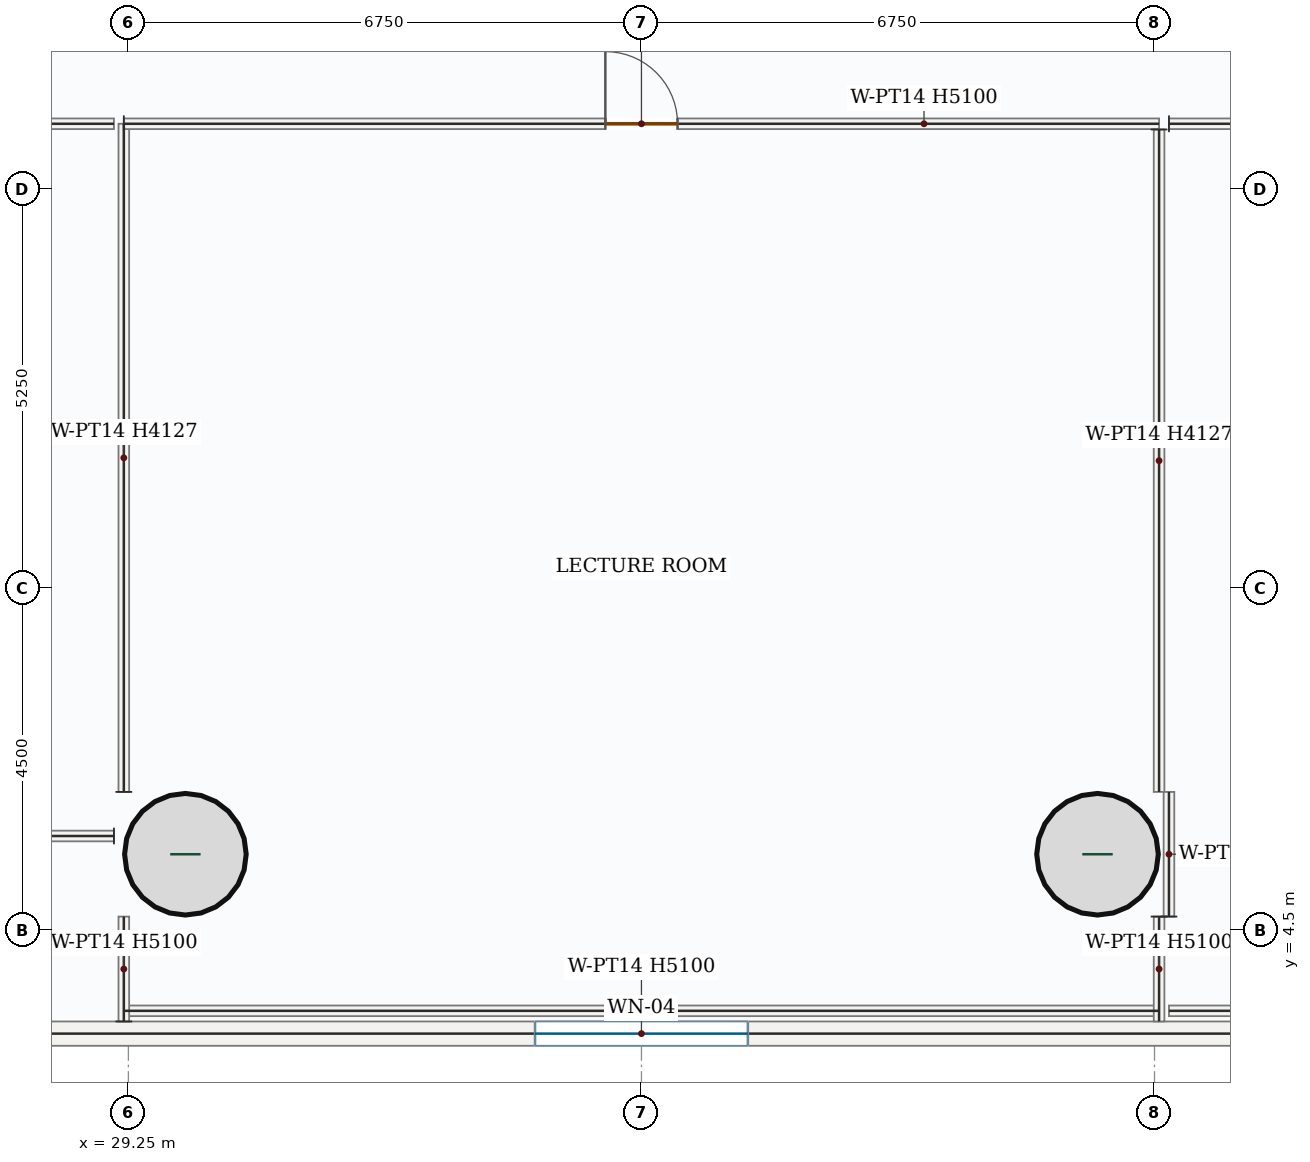
"""IFC4 building model, lengths in metres.
Left out: names, types, materials, properties, quantities, classifications, styles, units other than length and angle.
Written with IfcOpenShell. Run it as: python <this file> out.ifc"""

import sys

from ifc_helpers import new_model, si_unit, direction, frame, frame_2d, origin, origin_2d, place, context, subcontext, project, spatial, rectangle, hollow_circle, extrude, source, transform, mapped, element, fill, save


model = new_model("IFC4")
c1 = context("Model", 3, precision=1e-05, world=origin(), true_north=direction((0.0, 1.0)))
c2 = subcontext(c1, "Body", "Model", "MODEL_VIEW")
j1 = project(units=[si_unit("LENGTHUNIT", "METRE"), si_unit("PLANEANGLEUNIT", "RADIAN")], contexts=[c1])
p1 = place(None, origin())
s1 = spatial("IfcSite", under=j1, at=p1, CompositionType="ELEMENT")
p2 = place(p1, origin())
s2 = spatial("IfcBuilding", under=s1, at=p2, CompositionType="ELEMENT")
p3 = place(p2, frame((0.0, 0.0, 12.6)))
s3 = spatial("IfcBuildingStorey", under=s2, at=p3, CompositionType="ELEMENT", Elevation=12.6)
m1 = source(origin(), c2, "Body", "SweptSolid", [
    extrude(hollow_circle(Radius=0.8, WallThickness=0.06, at=origin_2d()), origin(), (0.0, 0.0, 1.0), 5.4),
])
for number, where, z_axis, x_axis in (
    (1, (30.0, 5.5, 0.0), (0.0, 0.0, 1.0), (1.0, 0.0, 0.0)),
    (2, (42.0, 5.5, 0.0), (0.0, 0.0, 1.0), (1.0, 0.0, 0.0)),
):
    element("IfcColumn", number, at=place(p3, frame(where, z_axis=z_axis, x_axis=x_axis)), inside=s3, PredefinedType="COLUMN", context=c2, shape_type="MappedRepresentation", body=[
        mapped(m1, transform((0.0, 0.0, 0.0), x_axis=(1.0, 0.0, 0.0), y_axis=(0.0, 1.0, 0.0), z_axis=(0.0, 0.0, 1.0), scale=1.0)),
    ])
p4 = place(p3, frame((67.16, 3.14, 0.0), z_axis=(0.0, 0.0, 1.0), x_axis=(-1.0, 0.0, 0.0)))
e3 = element("IfcWall", 3, at=p4, inside=s3, PredefinedType="SOLIDWALL", context=c2, shape_type="SweptSolid", body=[
    extrude(rectangle(XDim=62.32, YDim=0.32, at=frame_2d((31.16, 0.0))), origin(), (0.0, 0.0, 1.0), 5.1),
])
p5 = place(p4, frame((29.76, 0.0, 0.85)))
e4 = element("IfcOpeningElement", 4, at=p5, cuts=e3, PredefinedType="OPENING", context=c2, shape_type="SweptSolid", body=[
    extrude(rectangle(XDim=2.8, YDim=2.4, at=frame_2d((1.4, 1.2))), frame((0.0, 0.17, 0.0), z_axis=(0.0, -1.0, 0.0), x_axis=(1.0, 0.0, 0.0)), (0.0, 0.0, 1.0), 0.34),
])
m2 = source(origin(), c2, "Body", "SweptSolid", [
    extrude(rectangle(XDim=13.62, YDim=0.14, at=frame_2d((6.81, 0.0))), origin(), (0.0, 0.0, 1.0), 5.1),
])
p6 = place(p3, frame((42.81, 3.44, 0.0), z_axis=(0.0, 0.0, 1.0), x_axis=(-1.0, 0.0, 0.0)))
e5 = element("IfcWall", 5, at=p6, inside=s3, PredefinedType="PARTITIONING", context=c2, shape_type="MappedRepresentation", body=[
    mapped(m2, transform((0.0, 0.0, 0.0), x_axis=(1.0, 0.0, 0.0), y_axis=(0.0, 1.0, 0.0), z_axis=(0.0, 0.0, 1.0), scale=1.0)),
])
m3 = source(origin(), c2, "Body", "SweptSolid", [
    extrude(rectangle(XDim=1.38, YDim=0.14, at=frame_2d((0.69, 0.0))), origin(), (0.0, 0.0, 1.0), 5.1),
])
p7 = place(p3, frame((29.19, 3.3, 0.0), z_axis=(0.0, 0.0, 1.0), x_axis=(0.0, 1.0, 0.0)))
e6 = element("IfcWall", 6, at=p7, inside=s3, PredefinedType="PARTITIONING", context=c2, shape_type="MappedRepresentation", body=[
    mapped(m3, transform((0.0, 0.0, 0.0), x_axis=(1.0, 0.0, 0.0), y_axis=(0.0, 1.0, 0.0), z_axis=(0.0, 0.0, 1.0), scale=1.0)),
])
m4 = source(origin(), c2, "Body", "SweptSolid", [
    extrude(rectangle(XDim=8.79, YDim=0.14, at=frame_2d((4.395, 0.0))), origin(), (0.0, 0.0, 1.0), 4.127),
])
p8 = place(p3, frame((29.19, 6.32, 0.0), z_axis=(0.0, 0.0, 1.0), x_axis=(0.0, 1.0, 0.0)))
e7 = element("IfcWall", 7, at=p8, inside=s3, PredefinedType="PARTITIONING", context=c2, shape_type="MappedRepresentation", body=[
    mapped(m4, transform((0.0, 0.0, 0.0), x_axis=(1.0, 0.0, 0.0), y_axis=(0.0, 1.0, 0.0), z_axis=(0.0, 0.0, 1.0), scale=1.0)),
])
p9 = place(p3, frame((29.19, 15.11, 0.0), z_axis=(0.0, 0.0, 1.0), x_axis=(1.0, 0.0, 0.0)))
e8 = element("IfcWall", 8, at=p9, inside=s3, PredefinedType="PARTITIONING", context=c2, shape_type="SweptSolid", body=[
    extrude(rectangle(XDim=13.62, YDim=0.14, at=frame_2d((6.81, 0.0))), origin(), (0.0, 0.0, 1.0), 5.1),
])
p10 = place(p9, frame((6.335, 0.0, 0.0)))
e9 = element("IfcOpeningElement", 9, at=p10, cuts=e8, PredefinedType="OPENING", context=c2, shape_type="SweptSolid", body=[
    extrude(rectangle(XDim=0.95, YDim=2.15, at=frame_2d((0.475, 1.075))), frame((0.0, 0.08, 0.0), z_axis=(0.0, -1.0, 0.0), x_axis=(1.0, 0.0, 0.0)), (0.0, 0.0, 1.0), 0.16),
])
m5 = source(origin(), c2, "Body", "SweptSolid", [
    extrude(rectangle(XDim=8.715, YDim=0.14, at=frame_2d((4.357, 0.0))), origin(), (0.0, 0.0, 1.0), 4.127),
])
p11 = place(p3, frame((42.81, 15.035, 0.0), z_axis=(0.0, 0.0, 1.0), x_axis=(0.0, -1.0, 0.0)))
e10 = element("IfcWall", 10, at=p11, inside=s3, PredefinedType="PARTITIONING", context=c2, shape_type="MappedRepresentation", body=[
    mapped(m5, transform((0.0, 0.0, 0.0), x_axis=(1.0, 0.0, 0.0), y_axis=(0.0, 1.0, 0.0), z_axis=(0.0, 0.0, 1.0), scale=1.0)),
])
p12 = place(p3, frame((42.81, 4.68, 0.0), z_axis=(0.0, 0.0, 1.0), x_axis=(0.0, -1.0, 0.0)))
e11 = element("IfcWall", 11, at=p12, inside=s3, PredefinedType="PARTITIONING", context=c2, shape_type="MappedRepresentation", body=[
    mapped(m3, transform((0.0, 0.0, 0.0), x_axis=(1.0, 0.0, 0.0), y_axis=(0.0, 1.0, 0.0), z_axis=(0.0, 0.0, 1.0), scale=1.0)),
])
m6 = source(origin(), c2, "Body", "SweptSolid", [
    extrude(rectangle(XDim=21.74, YDim=0.14, at=frame_2d((10.87, 0.0))), origin(), (0.0, 0.0, 1.0), 4.47),
])
p13 = place(p3, frame((29.06, 5.74, 0.0), z_axis=(0.0, 0.0, 1.0), x_axis=(-1.0, 0.0, 0.0)))
e12 = element("IfcWall", 12, at=p13, inside=s3, PredefinedType="PARTITIONING", context=c2, shape_type="MappedRepresentation", body=[
    mapped(m6, transform((0.0, 0.0, 0.0), x_axis=(1.0, 0.0, 0.0), y_axis=(0.0, 1.0, 0.0), z_axis=(0.0, 0.0, 1.0), scale=1.0)),
])
m7 = source(origin(), c2, "Body", "SweptSolid", [
    extrude(rectangle(XDim=6.554, YDim=0.14, at=frame_2d((3.277, 0.0))), origin(), (0.0, 0.0, 1.0), 5.1),
])
p14 = place(p3, frame((22.506, 15.11, 0.0), z_axis=(0.0, 0.0, 1.0), x_axis=(1.0, 0.0, 0.0)))
e13 = element("IfcWall", 13, at=p14, inside=s3, PredefinedType="PARTITIONING", context=c2, shape_type="MappedRepresentation", body=[
    mapped(m7, transform((0.0, 0.0, 0.0), x_axis=(1.0, 0.0, 0.0), y_axis=(0.0, 1.0, 0.0), z_axis=(0.0, 0.0, 1.0), scale=1.0)),
])
m8 = source(origin(), c2, "Body", "SweptSolid", [
    extrude(rectangle(XDim=10.49, YDim=0.14, at=frame_2d((5.245, 0.0))), origin(), (0.0, 0.0, 1.0), 5.1),
])
p15 = place(p3, frame((53.43, 3.44, 0.0), z_axis=(0.0, 0.0, 1.0), x_axis=(-1.0, 0.0, 0.0)))
e14 = element("IfcWall", 14, at=p15, inside=s3, PredefinedType="PARTITIONING", context=c2, shape_type="MappedRepresentation", body=[
    mapped(m8, transform((0.0, 0.0, 0.0), x_axis=(1.0, 0.0, 0.0), y_axis=(0.0, 1.0, 0.0), z_axis=(0.0, 0.0, 1.0), scale=1.0)),
])
m9 = source(origin(), c2, "Body", "SweptSolid", [
    extrude(rectangle(XDim=1.64, YDim=0.14, at=frame_2d((0.82, 0.0))), origin(), (0.0, 0.0, 1.0), 5.1),
])
p16 = place(p3, frame((42.94, 4.68, 0.0), z_axis=(0.0, 0.0, 1.0), x_axis=(0.0, 1.0, 0.0)))
e15 = element("IfcWall", 15, at=p16, inside=s3, PredefinedType="PARTITIONING", context=c2, shape_type="MappedRepresentation", body=[
    mapped(m9, transform((0.0, 0.0, 0.0), x_axis=(1.0, 0.0, 0.0), y_axis=(0.0, 1.0, 0.0), z_axis=(0.0, 0.0, 1.0), scale=1.0)),
])
p17 = place(p3, frame((42.94, 15.11, 0.0), z_axis=(0.0, 0.0, 1.0), x_axis=(1.0, 0.0, 0.0)))
e16 = element("IfcWall", 16, at=p17, inside=s3, PredefinedType="PARTITIONING", context=c2, shape_type="MappedRepresentation", body=[
    mapped(m7, transform((0.0, 0.0, 0.0), x_axis=(1.0, 0.0, 0.0), y_axis=(0.0, 1.0, 0.0), z_axis=(0.0, 0.0, 1.0), scale=1.0)),
])
m10 = source(origin(), c2, "Body", "SweptSolid", [
    extrude(rectangle(XDim=2.8, YDim=2.4, at=frame_2d((1.4, 1.2))), frame((0.0, 0.03, 0.0), z_axis=(0.0, -1.0, 0.0), x_axis=(1.0, 0.0, 0.0)), (0.0, 0.0, 1.0), 0.06),
])
p18 = place(p5, origin())
e17 = element("IfcWindow", 17, at=p18, inside=s3, PartitioningType="TRIPLE_PANEL_VERTICAL", PredefinedType="WINDOW", context=c2, shape_type="MappedRepresentation", body=[
    mapped(m10, transform((0.0, 0.0, 0.0), x_axis=(1.0, 0.0, 0.0), y_axis=(0.0, 1.0, 0.0), z_axis=(0.0, 0.0, 1.0), scale=1.0)),
])
fill(e4, e17)
m11 = source(origin(), c2, "Body", "SweptSolid", [
    extrude(rectangle(XDim=0.95, YDim=2.15, at=frame_2d((0.475, 1.075))), frame((0.0, 0.025, 0.0), z_axis=(0.0, -1.0, 0.0), x_axis=(1.0, 0.0, 0.0)), (0.0, 0.0, 1.0), 0.05),
])
p19 = place(p10, origin())
e18 = element("IfcDoor", 18, at=p19, inside=s3, OperationType="SINGLE_SWING_LEFT", PredefinedType="DOOR", context=c2, shape_type="MappedRepresentation", body=[
    mapped(m11, transform((0.0, 0.0, 0.0), x_axis=(1.0, 0.0, 0.0), y_axis=(0.0, 1.0, 0.0), z_axis=(0.0, 0.0, 1.0), scale=1.0)),
])
fill(e9, e18)
save(model, sys.argv[1])
